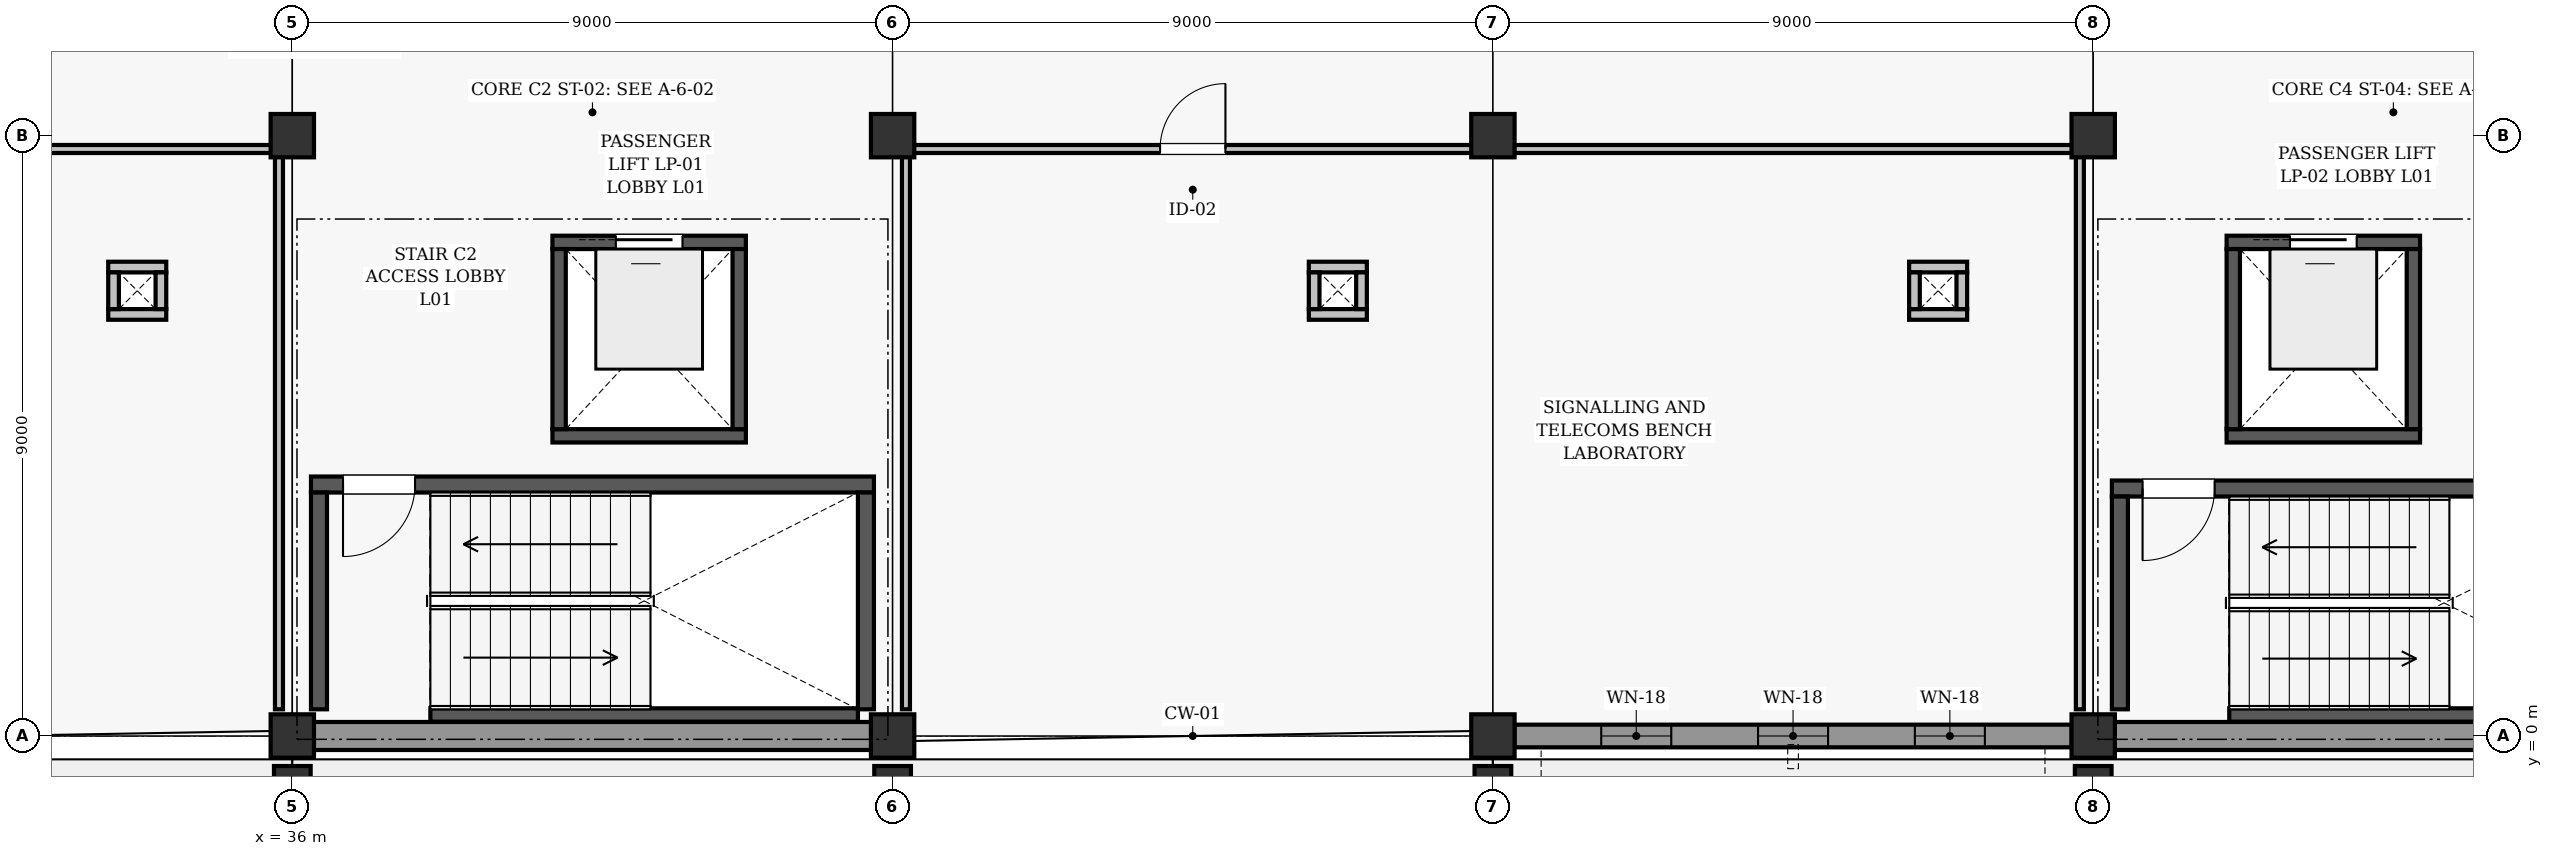
"""IFC4 building model, lengths in metres.
Left out: names, types, materials, properties, quantities, classifications, styles, units other than length and angle.
Written with IfcOpenShell. Run it as: python <this file> out.ifc"""

import sys

from ifc_helpers import new_model, si_unit, direction, frame, frame_2d, origin, origin_2d, place, context, subcontext, project, spatial, rectangle, extrude, element, fill, save


model = new_model("IFC4")
c1 = context("Model", 3, precision=1e-05, world=origin(), true_north=direction((0.0, 1.0)))
c2 = subcontext(c1, "Body", "Model", "MODEL_VIEW")
j1 = project(units=[si_unit("LENGTHUNIT", "METRE"), si_unit("PLANEANGLEUNIT", "RADIAN")], contexts=[c1])
p1 = place(None, origin())
s1 = spatial("IfcSite", under=j1, at=p1, CompositionType="ELEMENT")
p2 = place(p1, origin())
s2 = spatial("IfcBuilding", under=s1, at=p2, CompositionType="ELEMENT")
p3 = place(p2, frame((0.0, 0.0, 4.8)))
s3 = spatial("IfcBuildingStorey", under=s2, at=p3, CompositionType="ELEMENT", Elevation=4.8)
for number, where, z_axis, x_axis in (
    (1, (36.0, 0.0, 0.0), (0.0, 0.0, 1.0), (1.0, 0.0, 0.0)),
    (2, (36.0, 9.0, 0.0), (0.0, 0.0, 1.0), (1.0, 0.0, 0.0)),
    (3, (45.0, 0.0, 0.0), (0.0, 0.0, 1.0), (1.0, 0.0, 0.0)),
    (4, (45.0, 9.0, 0.0), (0.0, 0.0, 1.0), (1.0, 0.0, 0.0)),
    (5, (54.0, 0.0, 0.0), (0.0, 0.0, 1.0), (1.0, 0.0, 0.0)),
    (6, (54.0, 9.0, 0.0), (0.0, 0.0, 1.0), (1.0, 0.0, 0.0)),
    (7, (63.0, 0.0, 0.0), (0.0, 0.0, 1.0), (1.0, 0.0, 0.0)),
    (8, (63.0, 9.0, 0.0), (0.0, 0.0, 1.0), (1.0, 0.0, 0.0)),
):
    element("IfcColumn", number, at=place(p3, frame(where, z_axis=z_axis, x_axis=x_axis)), inside=s3, PredefinedType="COLUMN", context=c2, shape_type="SweptSolid", body=[
        extrude(rectangle(XDim=0.65, YDim=0.65, at=origin_2d()), origin(), (0.0, 0.0, 1.0), 3.6),
    ])
for number, where, z_axis, x_axis in (
    (9, (36.0, -0.85, 0.0), (0.0, 0.0, 1.0), (1.0, 0.0, 0.0)),
    (10, (45.0, -0.85, 0.0), (0.0, 0.0, 1.0), (1.0, 0.0, 0.0)),
    (11, (54.0, -0.85, 0.0), (0.0, 0.0, 1.0), (1.0, 0.0, 0.0)),
    (12, (63.0, -0.85, 0.0), (0.0, 0.0, 1.0), (1.0, 0.0, 0.0)),
):
    element("IfcColumn", number, at=place(p3, frame(where, z_axis=z_axis, x_axis=x_axis)), inside=s3, PredefinedType="PILASTER", context=c2, shape_type="SweptSolid", body=[
        extrude(rectangle(XDim=0.55, YDim=0.8, at=origin_2d()), origin(), (0.0, 0.0, 1.0), 3.6),
    ])
p4 = place(p3, frame((36.323, 0.0, 0.0), z_axis=(0.0, 0.0, 1.0), x_axis=(1.0, 0.0, 0.0)))
e13 = element("IfcWall", 13, at=p4, inside=s3, PredefinedType="SOLIDWALL", context=c2, shape_type="SweptSolid", body=[
    extrude(rectangle(XDim=8.354, YDim=0.42, at=frame_2d((4.177, 0.0))), origin(), (0.0, 0.0, 1.0), 2.642),
])
p5 = place(p3, frame((54.323, 0.0, 0.0), z_axis=(0.0, 0.0, 1.0), x_axis=(1.0, 0.0, 0.0)))
e14 = element("IfcWall", 14, at=p5, inside=s3, PredefinedType="SOLIDWALL", context=c2, shape_type="SweptSolid", body=[
    extrude(rectangle(XDim=8.354, YDim=0.34, at=frame_2d((4.177, 0.0))), origin(), (0.0, 0.0, 1.0), 2.642),
])
p6 = place(p5, frame((1.301, 0.0, 0.58)))
e15 = element("IfcOpeningElement", 15, at=p6, cuts=e14, PredefinedType="OPENING", context=c2, shape_type="SweptSolid", body=[
    extrude(rectangle(XDim=1.05, YDim=1.88, at=frame_2d((0.525, 0.94))), frame((0.0, 0.18, 0.0), z_axis=(0.0, -1.0, 0.0), x_axis=(1.0, 0.0, 0.0)), (0.0, 0.0, 1.0), 0.36),
])
p7 = place(p5, frame((3.652, 0.0, 0.58)))
e16 = element("IfcOpeningElement", 16, at=p7, cuts=e14, PredefinedType="OPENING", context=c2, shape_type="SweptSolid", body=[
    extrude(rectangle(XDim=1.05, YDim=1.88, at=frame_2d((0.525, 0.94))), frame((0.0, 0.18, 0.0), z_axis=(0.0, -1.0, 0.0), x_axis=(1.0, 0.0, 0.0)), (0.0, 0.0, 1.0), 0.36),
])
p8 = place(p5, frame((6.003, 0.0, 0.58)))
e17 = element("IfcOpeningElement", 17, at=p8, cuts=e14, PredefinedType="OPENING", context=c2, shape_type="SweptSolid", body=[
    extrude(rectangle(XDim=1.05, YDim=1.88, at=frame_2d((0.525, 0.94))), frame((0.0, 0.18, 0.0), z_axis=(0.0, -1.0, 0.0), x_axis=(1.0, 0.0, 0.0)), (0.0, 0.0, 1.0), 0.36),
])
p9 = place(p3, frame((63.323, 0.0, 0.0), z_axis=(0.0, 0.0, 1.0), x_axis=(1.0, 0.0, 0.0)))
e18 = element("IfcWall", 18, at=p9, inside=s3, PredefinedType="SOLIDWALL", context=c2, shape_type="SweptSolid", body=[
    extrude(rectangle(XDim=8.354, YDim=0.42, at=frame_2d((4.177, 0.0))), origin(), (0.0, 0.0, 1.0), 2.642),
])
p10 = place(p3, frame((38.07, 0.315, 0.0), z_axis=(0.0, 0.0, 1.0), x_axis=(1.0, 0.0, 0.0)))
e19 = element("IfcWall", 19, at=p10, inside=s3, PredefinedType="SHEAR", context=c2, shape_type="SweptSolid", body=[
    extrude(rectangle(XDim=6.41, YDim=0.2, at=frame_2d((3.205, 0.0))), origin(), (0.0, 0.0, 1.0), 3.35),
])
p11 = place(p3, frame((36.28, 3.77, 0.0), z_axis=(0.0, 0.0, 1.0), x_axis=(1.0, 0.0, 0.0)))
e20 = element("IfcWall", 20, at=p11, inside=s3, PredefinedType="SHEAR", context=c2, shape_type="SweptSolid", body=[
    extrude(rectangle(XDim=8.44, YDim=0.24, at=frame_2d((4.22, 0.0))), origin(), (0.0, 0.0, 1.0), 3.35),
])
p12 = place(p11, frame((0.48, 0.0, 0.0)))
e21 = element("IfcOpeningElement", 21, at=p12, cuts=e20, PredefinedType="OPENING", context=c2, shape_type="SweptSolid", body=[
    extrude(rectangle(XDim=1.08, YDim=2.08, at=frame_2d((0.54, 1.04))), frame((0.0, 0.13, 0.0), z_axis=(0.0, -1.0, 0.0), x_axis=(1.0, 0.0, 0.0)), (0.0, 0.0, 1.0), 0.26),
])
for number, where, z_axis, x_axis in (
    (22, (36.4, 0.4, 0.0), (0.0, 0.0, 1.0), (0.0, 1.0, 0.0)),
    (23, (44.6, 0.4, 0.0), (0.0, 0.0, 1.0), (0.0, 1.0, 0.0)),
):
    element("IfcWall", number, at=place(p3, frame(where, z_axis=z_axis, x_axis=x_axis)), inside=s3, PredefinedType="SHEAR", context=c2, shape_type="SweptSolid", body=[
        extrude(rectangle(XDim=3.25, YDim=0.24, at=frame_2d((1.625, 0.0))), origin(), (0.0, 0.0, 1.0), 3.35),
    ])
p13 = place(p3, frame((65.04, 0.315, 0.0), z_axis=(0.0, 0.0, 1.0), x_axis=(1.0, 0.0, 0.0)))
e24 = element("IfcWall", 24, at=p13, inside=s3, PredefinedType="SHEAR", context=c2, shape_type="SweptSolid", body=[
    extrude(rectangle(XDim=6.44, YDim=0.2, at=frame_2d((3.22, 0.0))), origin(), (0.0, 0.0, 1.0), 3.35),
])
p14 = place(p3, frame((63.28, 3.71, 0.0), z_axis=(0.0, 0.0, 1.0), x_axis=(1.0, 0.0, 0.0)))
e25 = element("IfcWall", 25, at=p14, inside=s3, PredefinedType="SHEAR", context=c2, shape_type="SweptSolid", body=[
    extrude(rectangle(XDim=8.44, YDim=0.24, at=frame_2d((4.22, 0.0))), origin(), (0.0, 0.0, 1.0), 3.35),
])
p15 = place(p14, frame((0.46, 0.0, 0.0)))
e26 = element("IfcOpeningElement", 26, at=p15, cuts=e25, PredefinedType="OPENING", context=c2, shape_type="SweptSolid", body=[
    extrude(rectangle(XDim=1.08, YDim=2.08, at=frame_2d((0.54, 1.04))), frame((0.0, 0.13, 0.0), z_axis=(0.0, -1.0, 0.0), x_axis=(1.0, 0.0, 0.0)), (0.0, 0.0, 1.0), 0.26),
])
p16 = place(p3, frame((63.4, 0.4, 0.0), z_axis=(0.0, 0.0, 1.0), x_axis=(0.0, 1.0, 0.0)))
e27 = element("IfcWall", 27, at=p16, inside=s3, PredefinedType="SHEAR", context=c2, shape_type="SweptSolid", body=[
    extrude(rectangle(XDim=3.19, YDim=0.24, at=frame_2d((1.595, 0.0))), origin(), (0.0, 0.0, 1.0), 3.35),
])
p17 = place(p3, frame((39.9, 4.5, 0.0), z_axis=(0.0, 0.0, 1.0), x_axis=(1.0, 0.0, 0.0)))
e28 = element("IfcWall", 28, at=p17, inside=s3, PredefinedType="SHEAR", context=c2, shape_type="SweptSolid", body=[
    extrude(rectangle(XDim=2.9, YDim=0.2, at=frame_2d((1.45, 0.0))), origin(), (0.0, 0.0, 1.0), 3.35),
])
p18 = place(p3, frame((39.9, 7.4, 0.0), z_axis=(0.0, 0.0, 1.0), x_axis=(1.0, 0.0, 0.0)))
e29 = element("IfcWall", 29, at=p18, inside=s3, PredefinedType="SHEAR", context=c2, shape_type="SweptSolid", body=[
    extrude(rectangle(XDim=2.9, YDim=0.2, at=frame_2d((1.45, 0.0))), origin(), (0.0, 0.0, 1.0), 3.35),
])
p19 = place(p18, frame((0.95, 0.0, 0.0)))
e30 = element("IfcOpeningElement", 30, at=p19, cuts=e29, PredefinedType="OPENING", context=c2, shape_type="SweptSolid", body=[
    extrude(rectangle(XDim=1.0, YDim=2.1, at=frame_2d((0.5, 1.05))), frame((0.0, 0.11, 0.0), z_axis=(0.0, -1.0, 0.0), x_axis=(1.0, 0.0, 0.0)), (0.0, 0.0, 1.0), 0.22),
])
for number, where, z_axis, x_axis in (
    (31, (40.0, 4.6, 0.0), (0.0, 0.0, 1.0), (0.0, 1.0, 0.0)),
    (32, (42.7, 4.6, 0.0), (0.0, 0.0, 1.0), (0.0, 1.0, 0.0)),
):
    element("IfcWall", number, at=place(p3, frame(where, z_axis=z_axis, x_axis=x_axis)), inside=s3, PredefinedType="SHEAR", context=c2, shape_type="SweptSolid", body=[
        extrude(rectangle(XDim=2.7, YDim=0.2, at=frame_2d((1.35, 0.0))), origin(), (0.0, 0.0, 1.0), 3.35),
    ])
p20 = place(p3, frame((65.0, 4.5, 0.0), z_axis=(0.0, 0.0, 1.0), x_axis=(1.0, 0.0, 0.0)))
e33 = element("IfcWall", 33, at=p20, inside=s3, PredefinedType="SHEAR", context=c2, shape_type="SweptSolid", body=[
    extrude(rectangle(XDim=2.9, YDim=0.2, at=frame_2d((1.45, 0.0))), origin(), (0.0, 0.0, 1.0), 3.35),
])
p21 = place(p3, frame((65.0, 7.4, 0.0), z_axis=(0.0, 0.0, 1.0), x_axis=(1.0, 0.0, 0.0)))
e34 = element("IfcWall", 34, at=p21, inside=s3, PredefinedType="SHEAR", context=c2, shape_type="SweptSolid", body=[
    extrude(rectangle(XDim=2.9, YDim=0.2, at=frame_2d((1.45, 0.0))), origin(), (0.0, 0.0, 1.0), 3.35),
])
p22 = place(p21, frame((0.95, 0.0, 0.0)))
e35 = element("IfcOpeningElement", 35, at=p22, cuts=e34, PredefinedType="OPENING", context=c2, shape_type="SweptSolid", body=[
    extrude(rectangle(XDim=1.0, YDim=2.1, at=frame_2d((0.5, 1.05))), frame((0.0, 0.11, 0.0), z_axis=(0.0, -1.0, 0.0), x_axis=(1.0, 0.0, 0.0)), (0.0, 0.0, 1.0), 0.22),
])
for number, where, z_axis, x_axis in (
    (36, (65.1, 4.6, 0.0), (0.0, 0.0, 1.0), (0.0, 1.0, 0.0)),
    (37, (67.8, 4.6, 0.0), (0.0, 0.0, 1.0), (0.0, 1.0, 0.0)),
):
    element("IfcWall", number, at=place(p3, frame(where, z_axis=z_axis, x_axis=x_axis)), inside=s3, PredefinedType="SHEAR", context=c2, shape_type="SweptSolid", body=[
        extrude(rectangle(XDim=2.7, YDim=0.2, at=frame_2d((1.35, 0.0))), origin(), (0.0, 0.0, 1.0), 3.35),
    ])
for number, where, z_axis, x_axis in (
    (38, (33.24, 6.32, 0.0), (0.0, 0.0, 1.0), (1.0, 0.0, 0.0)),
    (39, (33.24, 7.03, 0.0), (0.0, 0.0, 1.0), (1.0, 0.0, 0.0)),
):
    element("IfcWall", number, at=place(p3, frame(where, z_axis=z_axis, x_axis=x_axis)), inside=s3, PredefinedType="PARTITIONING", context=c2, shape_type="SweptSolid", body=[
        extrude(rectangle(XDim=0.87, YDim=0.16, at=frame_2d((0.435, 0.0))), origin(), (0.0, 0.0, 1.0), 3.35),
    ])
for number, where, z_axis, x_axis in (
    (40, (33.32, 6.4, 0.0), (0.0, 0.0, 1.0), (0.0, 1.0, 0.0)),
    (41, (34.03, 6.4, 0.0), (0.0, 0.0, 1.0), (0.0, 1.0, 0.0)),
):
    element("IfcWall", number, at=place(p3, frame(where, z_axis=z_axis, x_axis=x_axis)), inside=s3, PredefinedType="PARTITIONING", context=c2, shape_type="SweptSolid", body=[
        extrude(rectangle(XDim=0.55, YDim=0.16, at=frame_2d((0.275, 0.0))), origin(), (0.0, 0.0, 1.0), 3.35),
    ])
for number, where, z_axis, x_axis in (
    (42, (51.24, 6.32, 0.0), (0.0, 0.0, 1.0), (1.0, 0.0, 0.0)),
    (43, (51.24, 7.03, 0.0), (0.0, 0.0, 1.0), (1.0, 0.0, 0.0)),
):
    element("IfcWall", number, at=place(p3, frame(where, z_axis=z_axis, x_axis=x_axis)), inside=s3, PredefinedType="PARTITIONING", context=c2, shape_type="SweptSolid", body=[
        extrude(rectangle(XDim=0.87, YDim=0.16, at=frame_2d((0.435, 0.0))), origin(), (0.0, 0.0, 1.0), 3.35),
    ])
for number, where, z_axis, x_axis in (
    (44, (51.32, 6.4, 0.0), (0.0, 0.0, 1.0), (0.0, 1.0, 0.0)),
    (45, (52.03, 6.4, 0.0), (0.0, 0.0, 1.0), (0.0, 1.0, 0.0)),
):
    element("IfcWall", number, at=place(p3, frame(where, z_axis=z_axis, x_axis=x_axis)), inside=s3, PredefinedType="PARTITIONING", context=c2, shape_type="SweptSolid", body=[
        extrude(rectangle(XDim=0.55, YDim=0.16, at=frame_2d((0.275, 0.0))), origin(), (0.0, 0.0, 1.0), 3.35),
    ])
for number, where, z_axis, x_axis in (
    (46, (60.24, 6.32, 0.0), (0.0, 0.0, 1.0), (1.0, 0.0, 0.0)),
    (47, (60.24, 7.03, 0.0), (0.0, 0.0, 1.0), (1.0, 0.0, 0.0)),
):
    element("IfcWall", number, at=place(p3, frame(where, z_axis=z_axis, x_axis=x_axis)), inside=s3, PredefinedType="PARTITIONING", context=c2, shape_type="SweptSolid", body=[
        extrude(rectangle(XDim=0.87, YDim=0.16, at=frame_2d((0.435, 0.0))), origin(), (0.0, 0.0, 1.0), 3.35),
    ])
for number, where, z_axis, x_axis in (
    (48, (60.32, 6.4, 0.0), (0.0, 0.0, 1.0), (0.0, 1.0, 0.0)),
    (49, (61.03, 6.4, 0.0), (0.0, 0.0, 1.0), (0.0, 1.0, 0.0)),
):
    element("IfcWall", number, at=place(p3, frame(where, z_axis=z_axis, x_axis=x_axis)), inside=s3, PredefinedType="PARTITIONING", context=c2, shape_type="SweptSolid", body=[
        extrude(rectangle(XDim=0.55, YDim=0.16, at=frame_2d((0.275, 0.0))), origin(), (0.0, 0.0, 1.0), 3.35),
    ])
p23 = place(p3, frame((18.4, 8.8, 0.0), z_axis=(0.0, 0.0, 1.0), x_axis=(1.0, 0.0, 0.0)))
e50 = element("IfcWall", 50, at=p23, inside=s3, PredefinedType="PARTITIONING", context=c2, shape_type="SweptSolid", body=[
    extrude(rectangle(XDim=17.4, YDim=0.12, at=frame_2d((8.7, 0.0))), origin(), (0.0, 0.0, 1.0), 2.595),
])
p24 = place(p23, frame((3.63, 0.0, 0.0)))
e51 = element("IfcOpeningElement", 51, at=p24, cuts=e50, PredefinedType="OPENING", context=c2, shape_type="SweptSolid", body=[
    extrude(rectangle(XDim=0.94, YDim=2.06, at=frame_2d((0.47, 1.03))), frame((0.0, 0.07, 0.0), z_axis=(0.0, -1.0, 0.0), x_axis=(1.0, 0.0, 0.0)), (0.0, 0.0, 1.0), 0.14),
])
p25 = place(p3, frame((35.8, 0.4, 0.0), z_axis=(0.0, 0.0, 1.0), x_axis=(0.0, 1.0, 0.0)))
e52 = element("IfcWall", 52, at=p25, inside=s3, PredefinedType="PARTITIONING", context=c2, shape_type="SweptSolid", body=[
    extrude(rectangle(XDim=8.4, YDim=0.12, at=frame_2d((4.2, 0.0))), origin(), (0.0, 0.0, 1.0), 2.595),
])
p26 = place(p3, frame((45.2, 8.8, 0.0), z_axis=(0.0, 0.0, 1.0), x_axis=(1.0, 0.0, 0.0)))
e53 = element("IfcWall", 53, at=p26, inside=s3, PredefinedType="PARTITIONING", context=c2, shape_type="SweptSolid", body=[
    extrude(rectangle(XDim=17.6, YDim=0.12, at=frame_2d((8.8, 0.0))), origin(), (0.0, 0.0, 1.0), 2.595),
])
p27 = place(p26, frame((3.81, 0.0, 0.0)))
e54 = element("IfcOpeningElement", 54, at=p27, cuts=e53, PredefinedType="OPENING", context=c2, shape_type="SweptSolid", body=[
    extrude(rectangle(XDim=0.98, YDim=2.08, at=frame_2d((0.49, 1.04))), frame((0.0, 0.07, 0.0), z_axis=(0.0, -1.0, 0.0), x_axis=(1.0, 0.0, 0.0)), (0.0, 0.0, 1.0), 0.14),
])
for number, where, z_axis, x_axis in (
    (55, (45.2, 0.4, 0.0), (0.0, 0.0, 1.0), (0.0, 1.0, 0.0)),
    (56, (62.8, 0.4, 0.0), (0.0, 0.0, 1.0), (0.0, 1.0, 0.0)),
):
    element("IfcWall", number, at=place(p3, frame(where, z_axis=z_axis, x_axis=x_axis)), inside=s3, PredefinedType="PARTITIONING", context=c2, shape_type="SweptSolid", body=[
        extrude(rectangle(XDim=8.4, YDim=0.12, at=frame_2d((4.2, 0.0))), origin(), (0.0, 0.0, 1.0), 2.595),
    ])
p28 = place(p6, origin())
e57 = element("IfcWindow", 57, at=p28, inside=s3, PartitioningType="SINGLE_PANEL", PredefinedType="WINDOW", context=c2, shape_type="SweptSolid", body=[
    extrude(rectangle(XDim=1.05, YDim=1.88, at=frame_2d((0.525, 0.94))), frame((0.0, 0.03, 0.0), z_axis=(0.0, -1.0, 0.0), x_axis=(1.0, 0.0, 0.0)), (0.0, 0.0, 1.0), 0.06),
])
fill(e15, e57)
p29 = place(p7, origin())
e58 = element("IfcWindow", 58, at=p29, inside=s3, PartitioningType="SINGLE_PANEL", PredefinedType="WINDOW", context=c2, shape_type="SweptSolid", body=[
    extrude(rectangle(XDim=1.05, YDim=1.88, at=frame_2d((0.525, 0.94))), frame((0.0, 0.03, 0.0), z_axis=(0.0, -1.0, 0.0), x_axis=(1.0, 0.0, 0.0)), (0.0, 0.0, 1.0), 0.06),
])
fill(e16, e58)
p30 = place(p8, origin())
e59 = element("IfcWindow", 59, at=p30, inside=s3, PartitioningType="SINGLE_PANEL", PredefinedType="WINDOW", context=c2, shape_type="SweptSolid", body=[
    extrude(rectangle(XDim=1.05, YDim=1.88, at=frame_2d((0.525, 0.94))), frame((0.0, 0.03, 0.0), z_axis=(0.0, -1.0, 0.0), x_axis=(1.0, 0.0, 0.0)), (0.0, 0.0, 1.0), 0.06),
])
fill(e17, e59)
p31 = place(p12, frame((1.08, 0.0, 0.0), z_axis=(0.0, 0.0, 1.0), x_axis=(-1.0, 0.0, 0.0)))
e60 = element("IfcDoor", 60, at=p31, inside=s3, OperationType="SINGLE_SWING_LEFT", PredefinedType="DOOR", context=c2, shape_type="SweptSolid", body=[
    extrude(rectangle(XDim=1.08, YDim=2.08, at=frame_2d((0.54, 1.04))), frame((0.0, 0.025, 0.0), z_axis=(0.0, -1.0, 0.0), x_axis=(1.0, 0.0, 0.0)), (0.0, 0.0, 1.0), 0.05),
])
fill(e21, e60)
p32 = place(p15, frame((1.08, 0.0, 0.0), z_axis=(0.0, 0.0, 1.0), x_axis=(-1.0, 0.0, 0.0)))
e61 = element("IfcDoor", 61, at=p32, inside=s3, OperationType="SINGLE_SWING_LEFT", PredefinedType="DOOR", context=c2, shape_type="SweptSolid", body=[
    extrude(rectangle(XDim=1.08, YDim=2.08, at=frame_2d((0.54, 1.04))), frame((0.0, 0.025, 0.0), z_axis=(0.0, -1.0, 0.0), x_axis=(1.0, 0.0, 0.0)), (0.0, 0.0, 1.0), 0.05),
])
fill(e26, e61)
p33 = place(p19, origin())
e62 = element("IfcDoor", 62, at=p33, inside=s3, OperationType="SLIDING_TO_LEFT", PredefinedType="DOOR", context=c2, shape_type="SweptSolid", body=[
    extrude(rectangle(XDim=1.0, YDim=2.1, at=frame_2d((0.5, 1.05))), frame((0.0, 0.025, 0.0), z_axis=(0.0, -1.0, 0.0), x_axis=(1.0, 0.0, 0.0)), (0.0, 0.0, 1.0), 0.05),
])
fill(e30, e62)
p34 = place(p22, origin())
e63 = element("IfcDoor", 63, at=p34, inside=s3, OperationType="SLIDING_TO_LEFT", PredefinedType="DOOR", context=c2, shape_type="SweptSolid", body=[
    extrude(rectangle(XDim=1.0, YDim=2.1, at=frame_2d((0.5, 1.05))), frame((0.0, 0.025, 0.0), z_axis=(0.0, -1.0, 0.0), x_axis=(1.0, 0.0, 0.0)), (0.0, 0.0, 1.0), 0.05),
])
fill(e35, e63)
p35 = place(p27, origin())
e64 = element("IfcDoor", 64, at=p35, inside=s3, OperationType="SINGLE_SWING_RIGHT", PredefinedType="DOOR", context=c2, shape_type="SweptSolid", body=[
    extrude(rectangle(XDim=0.98, YDim=2.08, at=frame_2d((0.49, 1.04))), frame((0.0, 0.025, 0.0), z_axis=(0.0, -1.0, 0.0), x_axis=(1.0, 0.0, 0.0)), (0.0, 0.0, 1.0), 0.05),
])
fill(e54, e64)
save(model, sys.argv[1])
